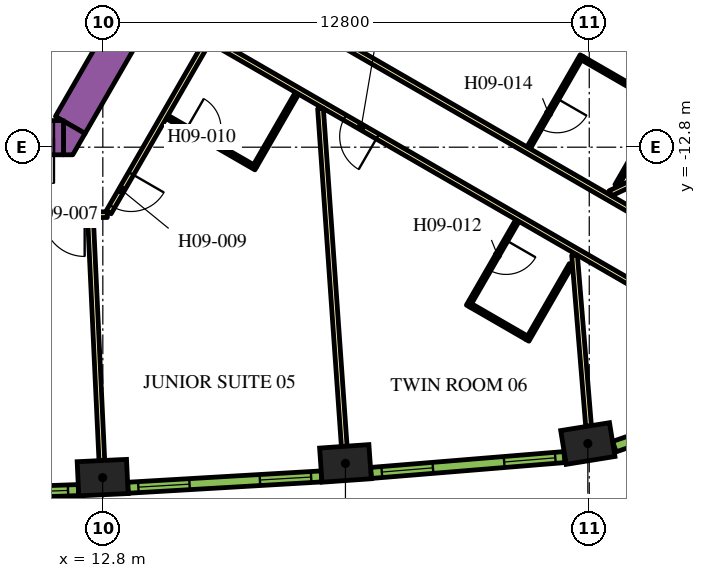
"""IFC4 building model, lengths in metres.
Left out: names, types, materials, properties, quantities, classifications, styles, units other than length and angle.
Written with IfcOpenShell. Run it as: python <this file> out.ifc"""

import sys

from ifc_helpers import new_model, si_unit, direction, frame, frame_2d, origin, origin_2d, place, context, subcontext, project, spatial, polyline, rectangle, outline, extrude, element, fill, save


model = new_model("IFC4")
c1 = context("Model", 3, precision=1e-05, world=origin(), true_north=direction((0.0, 1.0)))
c2 = subcontext(c1, "Body", "Model", "MODEL_VIEW")
j1 = project(units=[si_unit("LENGTHUNIT", "METRE"), si_unit("PLANEANGLEUNIT", "RADIAN")], contexts=[c1])
p1 = place(None, origin())
s1 = spatial("IfcSite", under=j1, at=p1, CompositionType="ELEMENT")
p2 = place(p1, origin())
s2 = spatial("IfcBuilding", under=s1, at=p2, CompositionType="ELEMENT")
p3 = place(p2, frame((0.0, 0.0, 118.8)))
s3 = spatial("IfcBuildingStorey", under=s2, at=p3, CompositionType="ELEMENT", Elevation=118.8)
for number, where, z_axis, x_axis in (
    (1, (12.795, -21.494, 0.0), (0.0, 0.0, 1.0), (0.999, 0.047, 0.0)),
    (2, (19.184, -21.12, 0.0), (0.0, 0.0, 1.0), (0.998, 0.07, 0.0)),
    (3, (25.563, -20.597, 0.0), (0.0, 0.0, 1.0), (0.987, 0.159, 0.0)),
):
    element("IfcColumn", number, at=place(p3, frame(where, z_axis=z_axis, x_axis=x_axis)), inside=s3, PredefinedType="COLUMN", context=c2, shape_type="SweptSolid", body=[
        extrude(rectangle(XDim=1.3, YDim=0.9, at=origin_2d()), origin(), (0.0, 0.0, 1.0), 3.9),
    ])
p4 = place(p3, frame((11.943, -12.214, 0.0), z_axis=(0.0, 0.0, 1.0), x_axis=(0.49998092645, 0.866036415623, 0.0)))
e4 = element("IfcWall", 4, at=p4, inside=s3, PredefinedType="SOLIDWALL", context=c2, shape_type="SweptSolid", body=[
    extrude(rectangle(XDim=8.83, YDim=0.9, at=frame_2d((4.415, 0.0))), origin(), (0.0, 0.0, 1.0), 3.9),
])
p5 = place(p3, origin())
e5 = element("IfcWall", 5, at=p5, inside=s3, PredefinedType="SOLIDWALL", context=c2, shape_type="SweptSolid", body=[
    extrude(outline(polyline([(12.009, -13.0), (11.764, -13.0), (11.764, -12.113), (12.332, -12.441), (12.009, -13.0)])), origin(), (0.0, 0.0, 1.0), 3.9),
])
p6 = place(p3, frame((11.764, -12.55, 0.0), z_axis=(0.0, 0.0, 1.0), x_axis=(-1.0, 0.0, 0.0)))
e6 = element("IfcWall", 6, at=p6, inside=s3, PredefinedType="SOLIDWALL", context=c2, shape_type="SweptSolid", body=[
    extrude(rectangle(XDim=1.7, YDim=0.9, at=frame_2d((0.85, 0.0))), origin(), (0.0, 0.0, 1.0), 3.9),
])
p7 = place(p6, frame((0.25, 0.0, 0.0)))
e7 = element("IfcOpeningElement", 7, at=p7, cuts=e6, PredefinedType="OPENING", context=c2, shape_type="SweptSolid", body=[
    extrude(rectangle(XDim=1.2, YDim=2.1, at=frame_2d((0.6, 1.05))), frame((0.0, 0.46, 0.0), z_axis=(0.0, -1.0, 0.0), x_axis=(1.0, 0.0, 0.0)), (0.0, 0.0, 1.0), 0.92),
])
p8 = place(p3, frame((16.412, -8.523, 0.0), z_axis=(0.0, 0.0, 1.0), x_axis=(0.866025629663, -0.499999608766, 0.0)))
e8 = element("IfcWall", 8, at=p8, inside=s3, PredefinedType="PARTITIONING", context=c2, shape_type="SweptSolid", body=[
    extrude(rectangle(XDim=13.624, YDim=0.15, at=frame_2d((6.812, 0.0))), origin(), (0.0, 0.0, 1.0), 2.75),
])
p9 = place(p8, frame((0.426, 0.0, 0.0)))
e9 = element("IfcOpeningElement", 9, at=p9, cuts=e8, PredefinedType="OPENING", context=c2, shape_type="SweptSolid", body=[
    extrude(rectangle(XDim=1.0, YDim=2.1, at=frame_2d((0.5, 1.05))), frame((0.0, 0.085, 0.0), z_axis=(0.0, -1.0, 0.0), x_axis=(1.0, 0.0, 0.0)), (0.0, 0.0, 1.0), 0.17),
])
p10 = place(p3, frame((12.918, -14.575, 0.0), z_axis=(0.0, 0.0, 1.0), x_axis=(-1.0, 0.0, 0.0)))
e10 = element("IfcWall", 10, at=p10, inside=s3, PredefinedType="PARTITIONING", context=c2, shape_type="SweptSolid", body=[
    extrude(rectangle(XDim=25.766, YDim=0.15, at=frame_2d((12.883, 0.0))), origin(), (0.0, 0.0, 1.0), 2.75),
])
p11 = place(p10, frame((16.189, 0.0, 0.0)))
e11 = element("IfcOpeningElement", 11, at=p11, cuts=e10, PredefinedType="OPENING", context=c2, shape_type="SweptSolid", body=[
    extrude(rectangle(XDim=1.0, YDim=2.1, at=frame_2d((0.5, 1.05))), frame((0.0, 0.085, 0.0), z_axis=(0.0, -1.0, 0.0), x_axis=(1.0, 0.0, 0.0)), (0.0, 0.0, 1.0), 0.17),
])
p12 = place(p10, frame((14.882, 0.0, 0.0)))
e12 = element("IfcOpeningElement", 12, at=p12, cuts=e10, PredefinedType="OPENING", context=c2, shape_type="SweptSolid", body=[
    extrude(rectangle(XDim=1.0, YDim=2.1, at=frame_2d((0.5, 1.05))), frame((0.0, 0.085, 0.0), z_axis=(0.0, -1.0, 0.0), x_axis=(1.0, 0.0, 0.0)), (0.0, 0.0, 1.0), 0.17),
])
p13 = place(p10, frame((0.596, 0.0, 0.0)))
e13 = element("IfcOpeningElement", 13, at=p13, cuts=e10, PredefinedType="OPENING", context=c2, shape_type="SweptSolid", body=[
    extrude(rectangle(XDim=1.1, YDim=2.1, at=frame_2d((0.55, 1.05))), frame((0.0, 0.085, 0.0), z_axis=(0.0, -1.0, 0.0), x_axis=(1.0, 0.0, 0.0)), (0.0, 0.0, 1.0), 0.17),
])
p14 = place(p3, frame((15.587, -9.952, 0.0), z_axis=(0.0, 0.0, 1.0), x_axis=(-0.500016618951, -0.866015808616, 0.0)))
e14 = element("IfcWall", 14, at=p14, inside=s3, PredefinedType="PARTITIONING", context=c2, shape_type="SweptSolid", body=[
    extrude(rectangle(XDim=5.268, YDim=0.15, at=frame_2d((2.634, 0.0))), origin(), (0.0, 0.0, 1.0), 2.75),
])
p15 = place(p14, frame((4.088, 0.0, 0.0)))
e15 = element("IfcOpeningElement", 15, at=p15, cuts=e14, PredefinedType="OPENING", context=c2, shape_type="SweptSolid", body=[
    extrude(rectangle(XDim=1.0, YDim=2.1, at=frame_2d((0.5, 1.05))), frame((0.0, 0.085, 0.0), z_axis=(0.0, -1.0, 0.0), x_axis=(1.0, 0.0, 0.0)), (0.0, 0.0, 1.0), 0.17),
])
p16 = place(p3, frame((27.386, -16.764, 0.0), z_axis=(0.0, 0.0, 1.0), x_axis=(-0.866022585856, 0.500004880763, 0.0)))
e16 = element("IfcWall", 16, at=p16, inside=s3, PredefinedType="PARTITIONING", context=c2, shape_type="SweptSolid", body=[
    extrude(rectangle(XDim=13.544, YDim=0.15, at=frame_2d((6.772, 0.0))), origin(), (0.0, 0.0, 1.0), 2.75),
])
p17 = place(p16, frame((8.491, 0.0, 0.0)))
e17 = element("IfcOpeningElement", 17, at=p17, cuts=e16, PredefinedType="OPENING", context=c2, shape_type="SweptSolid", body=[
    extrude(rectangle(XDim=1.0, YDim=2.1, at=frame_2d((0.5, 1.05))), frame((0.0, 0.085, 0.0), z_axis=(0.0, -1.0, 0.0), x_axis=(1.0, 0.0, 0.0)), (0.0, 0.0, 1.0), 0.17),
])
p18 = place(p3, frame((12.774, -21.045, 0.0), z_axis=(0.0, 0.0, 1.0), x_axis=(-0.046750341626, 0.998906605023, 0.0)))
e18 = element("IfcWall", 18, at=p18, inside=s3, PredefinedType="PARTITIONING", context=c2, shape_type="SweptSolid", body=[
    extrude(rectangle(XDim=6.392, YDim=0.15, at=frame_2d((3.196, 0.0))), origin(), (0.0, 0.0, 1.0), 2.75),
])
p19 = place(p3, frame((19.153, -20.671, 0.0), z_axis=(0.0, 0.0, 1.0), x_axis=(-0.070070736723, 0.997542025107, 0.0)))
e19 = element("IfcWall", 19, at=p19, inside=s3, PredefinedType="PARTITIONING", context=c2, shape_type="SweptSolid", body=[
    extrude(rectangle(XDim=8.909, YDim=0.15, at=frame_2d((4.455, 0.0))), origin(), (0.0, 0.0, 1.0), 2.75),
])
p20 = place(p3, frame((25.582, -20.138, 0.0), z_axis=(0.0, 0.0, 1.0), x_axis=(-0.081746132986, 0.996653184283, 0.0)))
e20 = element("IfcWall", 20, at=p20, inside=s3, PredefinedType="PARTITIONING", context=c2, shape_type="SweptSolid", body=[
    extrude(rectangle(XDim=4.51, YDim=0.15, at=frame_2d((2.255, 0.0))), origin(), (0.0, 0.0, 1.0), 2.75),
])
p21 = place(p3, frame((30.231, -12.085, 0.0), z_axis=(0.0, 0.0, 1.0), x_axis=(-0.904001132572, -0.427530060122, 0.0)))
e21 = element("IfcWall", 21, at=p21, inside=s3, PredefinedType="PARTITIONING", context=c2, shape_type="SweptSolid", body=[
    extrude(rectangle(XDim=4.51, YDim=0.15, at=frame_2d((2.255, 0.0))), origin(), (0.0, 0.0, 1.0), 2.75),
])
p22 = place(p3, frame((14.49, -12.003, 0.0), z_axis=(0.0, 0.0, 1.0), x_axis=(0.866059108428, -0.4999416173, 0.0)))
e22 = element("IfcWall", 22, at=p22, inside=s3, PredefinedType="PARTITIONING", context=c2, shape_type="SweptSolid", body=[
    extrude(rectangle(XDim=2.7, YDim=0.1, at=frame_2d((1.35, 0.0))), origin(), (0.0, 0.0, 1.0), 2.75),
])
p23 = place(p22, frame((0.6, 0.0, 0.0)))
e23 = element("IfcOpeningElement", 23, at=p23, cuts=e22, PredefinedType="OPENING", context=c2, shape_type="SweptSolid", body=[
    extrude(rectangle(XDim=0.9, YDim=2.1, at=frame_2d((0.45, 1.05))), frame((0.0, 0.06, 0.0), z_axis=(0.0, -1.0, 0.0), x_axis=(1.0, 0.0, 0.0)), (0.0, 0.0, 1.0), 0.12),
])
p24 = place(p3, frame((16.81, -13.285, 0.0), z_axis=(0.0, 0.0, 1.0), x_axis=(0.499994660107, 0.866028486751, 0.0)))
e24 = element("IfcWall", 24, at=p24, inside=s3, PredefinedType="PARTITIONING", context=c2, shape_type="SweptSolid", body=[
    extrude(rectangle(XDim=2.2, YDim=0.1, at=frame_2d((1.1, 0.0))), origin(), (0.0, 0.0, 1.0), 2.75),
])
p25 = place(p3, frame((23.71, -14.728, 0.0), z_axis=(0.0, 0.0, 1.0), x_axis=(-0.500006934395, -0.866021400173, 0.0)))
e25 = element("IfcWall", 25, at=p25, inside=s3, PredefinedType="PARTITIONING", context=c2, shape_type="SweptSolid", body=[
    extrude(rectangle(XDim=2.6, YDim=0.1, at=frame_2d((1.3, 0.0))), origin(), (0.0, 0.0, 1.0), 2.75),
])
p26 = place(p25, frame((0.6, 0.0, 0.0)))
e26 = element("IfcOpeningElement", 26, at=p26, cuts=e25, PredefinedType="OPENING", context=c2, shape_type="SweptSolid", body=[
    extrude(rectangle(XDim=0.9, YDim=2.1, at=frame_2d((0.45, 1.05))), frame((0.0, 0.06, 0.0), z_axis=(0.0, -1.0, 0.0), x_axis=(1.0, 0.0, 0.0)), (0.0, 0.0, 1.0), 0.12),
])
p27 = place(p3, frame((22.479, -16.962, 0.0), z_axis=(0.0, 0.0, 1.0), x_axis=(0.86605165483, -0.499954529098, 0.0)))
e27 = element("IfcWall", 27, at=p27, inside=s3, PredefinedType="PARTITIONING", context=c2, shape_type="SweptSolid", body=[
    extrude(rectangle(XDim=1.7, YDim=0.1, at=frame_2d((0.85, 0.0))), origin(), (0.0, 0.0, 1.0), 2.75),
])
p28 = place(p3, frame((25.119, -15.888, 0.0), z_axis=(0.0, 0.0, 1.0), x_axis=(-0.499998129301, -0.86602648383, 0.0)))
e28 = element("IfcWall", 28, at=p28, inside=s3, PredefinedType="PARTITIONING", context=c2, shape_type="SweptSolid", body=[
    extrude(rectangle(XDim=2.3, YDim=0.1, at=frame_2d((1.15, 0.0))), origin(), (0.0, 0.0, 1.0), 2.75),
])
p29 = place(p3, frame((25.404, -10.395, 0.0), z_axis=(0.0, 0.0, 1.0), x_axis=(-0.49998411664, -0.866034573852, 0.0)))
e29 = element("IfcWall", 29, at=p29, inside=s3, PredefinedType="PARTITIONING", context=c2, shape_type="SweptSolid", body=[
    extrude(rectangle(XDim=2.8, YDim=0.1, at=frame_2d((1.4, 0.0))), origin(), (0.0, 0.0, 1.0), 2.75),
])
p30 = place(p29, frame((1.3, 0.0, 0.0)))
e30 = element("IfcOpeningElement", 30, at=p30, cuts=e29, PredefinedType="OPENING", context=c2, shape_type="SweptSolid", body=[
    extrude(rectangle(XDim=0.9, YDim=2.1, at=frame_2d((0.45, 1.05))), frame((0.0, 0.06, 0.0), z_axis=(0.0, -1.0, 0.0), x_axis=(1.0, 0.0, 0.0)), (0.0, 0.0, 1.0), 0.12),
])
p31 = place(p3, frame((25.422, -10.463, 0.0), z_axis=(0.0, 0.0, 1.0), x_axis=(0.866024647952, -0.500001309137, 0.0)))
e31 = element("IfcWall", 31, at=p31, inside=s3, PredefinedType="PARTITIONING", context=c2, shape_type="SweptSolid", body=[
    extrude(rectangle(XDim=2.4, YDim=0.1, at=frame_2d((1.2, 0.0))), origin(), (0.0, 0.0, 1.0), 2.75),
])
p32 = place(p3, frame((26.319, -13.81, 0.0), z_axis=(0.0, 0.0, 1.0), x_axis=(0.500004234368, 0.866022959057, 0.0)))
e32 = element("IfcWall", 32, at=p32, inside=s3, PredefinedType="PARTITIONING", context=c2, shape_type="SweptSolid", body=[
    extrude(rectangle(XDim=2.5, YDim=0.1, at=frame_2d((1.25, 0.0))), origin(), (0.0, 0.0, 1.0), 2.75),
])
p33 = place(p3, frame((7.059, -22.001, 0.0), z_axis=(0.0, 0.0, 1.0), x_axis=(0.999385993957, 0.035037623812, 0.0)))
e33 = element("IfcWall", 33, at=p33, inside=s3, PredefinedType="SOLIDWALL", context=c2, shape_type="SweptSolid", body=[
    extrude(rectangle(XDim=5.101, YDim=0.29, at=frame_2d((2.55, 0.0))), origin(), (0.0, 0.0, 1.0), 3.65),
])
p34 = place(p33, frame((0.273, 0.0, 0.9)))
e34 = element("IfcOpeningElement", 34, at=p34, cuts=e33, PredefinedType="OPENING", context=c2, shape_type="SweptSolid", body=[
    extrude(rectangle(XDim=1.35, YDim=2.15, at=frame_2d((0.675, 1.075))), frame((0.0, 0.155, 0.0), z_axis=(0.0, -1.0, 0.0), x_axis=(1.0, 0.0, 0.0)), (0.0, 0.0, 1.0), 0.31),
])
p35 = place(p33, frame((3.478, 0.0, 0.9)))
e35 = element("IfcOpeningElement", 35, at=p35, cuts=e33, PredefinedType="OPENING", context=c2, shape_type="SweptSolid", body=[
    extrude(rectangle(XDim=1.35, YDim=2.15, at=frame_2d((0.675, 1.075))), frame((0.0, 0.155, 0.0), z_axis=(0.0, -1.0, 0.0), x_axis=(1.0, 0.0, 0.0)), (0.0, 0.0, 1.0), 0.31),
])
p36 = place(p3, frame((13.462, -21.761, 0.0), z_axis=(0.0, 0.0, 1.0), x_axis=(0.998290511436, 0.058447025388, 0.0)))
e36 = element("IfcWall", 36, at=p36, inside=s3, PredefinedType="SOLIDWALL", context=c2, shape_type="SweptSolid", body=[
    extrude(rectangle(XDim=5.1, YDim=0.29, at=frame_2d((2.55, 0.0))), origin(), (0.0, 0.0, 1.0), 3.65),
])
p37 = place(p36, frame((0.272, 0.0, 0.9)))
e37 = element("IfcOpeningElement", 37, at=p37, cuts=e36, PredefinedType="OPENING", context=c2, shape_type="SweptSolid", body=[
    extrude(rectangle(XDim=1.35, YDim=2.15, at=frame_2d((0.675, 1.075))), frame((0.0, 0.155, 0.0), z_axis=(0.0, -1.0, 0.0), x_axis=(1.0, 0.0, 0.0)), (0.0, 0.0, 1.0), 0.31),
])
p38 = place(p36, frame((3.478, 0.0, 0.9)))
e38 = element("IfcOpeningElement", 38, at=p38, cuts=e36, PredefinedType="OPENING", context=c2, shape_type="SweptSolid", body=[
    extrude(rectangle(XDim=1.35, YDim=2.15, at=frame_2d((0.675, 1.075))), frame((0.0, 0.155, 0.0), z_axis=(0.0, -1.0, 0.0), x_axis=(1.0, 0.0, 0.0)), (0.0, 0.0, 1.0), 0.31),
])
p39 = place(p3, frame((19.857, -21.371, 0.0), z_axis=(0.0, 0.0, 1.0), x_axis=(0.99665273362, 0.081751627308, 0.0)))
e39 = element("IfcWall", 39, at=p39, inside=s3, PredefinedType="SOLIDWALL", context=c2, shape_type="SweptSolid", body=[
    extrude(rectangle(XDim=5.107, YDim=0.29, at=frame_2d((2.553, 0.0))), origin(), (0.0, 0.0, 1.0), 3.65),
])
p40 = place(p39, frame((0.285, 0.0, 0.9)))
e40 = element("IfcOpeningElement", 40, at=p40, cuts=e39, PredefinedType="OPENING", context=c2, shape_type="SweptSolid", body=[
    extrude(rectangle(XDim=1.35, YDim=2.15, at=frame_2d((0.675, 1.075))), frame((0.0, 0.155, 0.0), z_axis=(0.0, -1.0, 0.0), x_axis=(1.0, 0.0, 0.0)), (0.0, 0.0, 1.0), 0.31),
])
p41 = place(p39, frame((3.516, 0.0, 0.9)))
e41 = element("IfcOpeningElement", 41, at=p41, cuts=e39, PredefinedType="OPENING", context=c2, shape_type="SweptSolid", body=[
    extrude(rectangle(XDim=1.35, YDim=2.15, at=frame_2d((0.675, 1.075))), frame((0.0, 0.155, 0.0), z_axis=(0.0, -1.0, 0.0), x_axis=(1.0, 0.0, 0.0)), (0.0, 0.0, 1.0), 0.31),
])
p42 = place(p3, frame((26.261, -20.679, 0.0), z_axis=(0.0, 0.0, 1.0), x_axis=(0.945385815453, 0.325953462844, 0.0)))
e42 = element("IfcWall", 42, at=p42, inside=s3, PredefinedType="SOLIDWALL", context=c2, shape_type="SweptSolid", body=[
    extrude(rectangle(XDim=1.819, YDim=0.29, at=frame_2d((0.91, 0.0))), origin(), (0.0, 0.0, 1.0), 3.65),
])
p43 = place(p42, frame((0.46, 0.0, 0.9)))
e43 = element("IfcOpeningElement", 43, at=p43, cuts=e42, PredefinedType="OPENING", context=c2, shape_type="SweptSolid", body=[
    extrude(rectangle(XDim=0.9, YDim=2.15, at=frame_2d((0.45, 1.075))), frame((0.0, 0.155, 0.0), z_axis=(0.0, -1.0, 0.0), x_axis=(1.0, 0.0, 0.0)), (0.0, 0.0, 1.0), 0.31),
])
p44 = place(p7, origin())
e44 = element("IfcDoor", 44, at=p44, inside=s3, OperationType="SINGLE_SWING_LEFT", PredefinedType="DOOR", context=c2, shape_type="SweptSolid", body=[
    extrude(rectangle(XDim=1.2, YDim=2.1, at=frame_2d((0.6, 1.05))), frame((0.0, 0.025, 0.0), z_axis=(0.0, -1.0, 0.0), x_axis=(1.0, 0.0, 0.0)), (0.0, 0.0, 1.0), 0.05),
])
fill(e7, e44)
p45 = place(p13, origin())
e45 = element("IfcDoor", 45, at=p45, inside=s3, OperationType="SINGLE_SWING_LEFT", PredefinedType="DOOR", context=c2, shape_type="SweptSolid", body=[
    extrude(rectangle(XDim=1.1, YDim=2.1, at=frame_2d((0.55, 1.05))), frame((0.0, 0.025, 0.0), z_axis=(0.0, -1.0, 0.0), x_axis=(1.0, 0.0, 0.0)), (0.0, 0.0, 1.0), 0.05),
])
fill(e13, e45)
p46 = place(p15, origin())
e46 = element("IfcDoor", 46, at=p46, inside=s3, OperationType="SINGLE_SWING_RIGHT", PredefinedType="DOOR", context=c2, shape_type="SweptSolid", body=[
    extrude(rectangle(XDim=1.0, YDim=2.1, at=frame_2d((0.5, 1.05))), frame((0.0, 0.025, 0.0), z_axis=(0.0, -1.0, 0.0), x_axis=(1.0, 0.0, 0.0)), (0.0, 0.0, 1.0), 0.05),
])
fill(e15, e46)
p47 = place(p23, origin())
e47 = element("IfcDoor", 47, at=p47, inside=s3, OperationType="SINGLE_SWING_LEFT", PredefinedType="DOOR", context=c2, shape_type="SweptSolid", body=[
    extrude(rectangle(XDim=0.9, YDim=2.1, at=frame_2d((0.45, 1.05))), frame((0.0, 0.025, 0.0), z_axis=(0.0, -1.0, 0.0), x_axis=(1.0, 0.0, 0.0)), (0.0, 0.0, 1.0), 0.05),
])
fill(e23, e47)
p48 = place(p17, origin())
e48 = element("IfcDoor", 48, at=p48, inside=s3, OperationType="SINGLE_SWING_RIGHT", PredefinedType="DOOR", context=c2, shape_type="SweptSolid", body=[
    extrude(rectangle(XDim=1.0, YDim=2.1, at=frame_2d((0.5, 1.05))), frame((0.0, 0.025, 0.0), z_axis=(0.0, -1.0, 0.0), x_axis=(1.0, 0.0, 0.0)), (0.0, 0.0, 1.0), 0.05),
])
fill(e17, e48)
p49 = place(p26, origin())
e49 = element("IfcDoor", 49, at=p49, inside=s3, OperationType="SINGLE_SWING_RIGHT", PredefinedType="DOOR", context=c2, shape_type="SweptSolid", body=[
    extrude(rectangle(XDim=0.9, YDim=2.1, at=frame_2d((0.45, 1.05))), frame((0.0, 0.025, 0.0), z_axis=(0.0, -1.0, 0.0), x_axis=(1.0, 0.0, 0.0)), (0.0, 0.0, 1.0), 0.05),
])
fill(e26, e49)
p50 = place(p30, origin())
e50 = element("IfcDoor", 50, at=p50, inside=s3, OperationType="SINGLE_SWING_LEFT", PredefinedType="DOOR", context=c2, shape_type="SweptSolid", body=[
    extrude(rectangle(XDim=0.9, YDim=2.1, at=frame_2d((0.45, 1.05))), frame((0.0, 0.025, 0.0), z_axis=(0.0, -1.0, 0.0), x_axis=(1.0, 0.0, 0.0)), (0.0, 0.0, 1.0), 0.05),
])
fill(e30, e50)
p51 = place(p35, origin())
e51 = element("IfcWindow", 51, at=p51, inside=s3, PartitioningType="DOUBLE_PANEL_VERTICAL", PredefinedType="WINDOW", context=c2, shape_type="SweptSolid", body=[
    extrude(rectangle(XDim=1.35, YDim=2.15, at=frame_2d((0.675, 1.075))), frame((0.0, 0.015, 0.0), z_axis=(0.0, -1.0, 0.0), x_axis=(1.0, 0.0, 0.0)), (0.0, 0.0, 1.0), 0.06),
])
fill(e35, e51)
p52 = place(p37, origin())
e52 = element("IfcWindow", 52, at=p52, inside=s3, PartitioningType="DOUBLE_PANEL_VERTICAL", PredefinedType="WINDOW", context=c2, shape_type="SweptSolid", body=[
    extrude(rectangle(XDim=1.35, YDim=2.15, at=frame_2d((0.675, 1.075))), frame((0.0, 0.015, 0.0), z_axis=(0.0, -1.0, 0.0), x_axis=(1.0, 0.0, 0.0)), (0.0, 0.0, 1.0), 0.06),
])
fill(e37, e52)
p53 = place(p38, origin())
e53 = element("IfcWindow", 53, at=p53, inside=s3, PartitioningType="DOUBLE_PANEL_VERTICAL", PredefinedType="WINDOW", context=c2, shape_type="SweptSolid", body=[
    extrude(rectangle(XDim=1.35, YDim=2.15, at=frame_2d((0.675, 1.075))), frame((0.0, 0.015, 0.0), z_axis=(0.0, -1.0, 0.0), x_axis=(1.0, 0.0, 0.0)), (0.0, 0.0, 1.0), 0.06),
])
fill(e38, e53)
p54 = place(p40, origin())
e54 = element("IfcWindow", 54, at=p54, inside=s3, PartitioningType="DOUBLE_PANEL_VERTICAL", PredefinedType="WINDOW", context=c2, shape_type="SweptSolid", body=[
    extrude(rectangle(XDim=1.35, YDim=2.15, at=frame_2d((0.675, 1.075))), frame((0.0, 0.015, 0.0), z_axis=(0.0, -1.0, 0.0), x_axis=(1.0, 0.0, 0.0)), (0.0, 0.0, 1.0), 0.06),
])
fill(e40, e54)
p55 = place(p41, origin())
e55 = element("IfcWindow", 55, at=p55, inside=s3, PartitioningType="DOUBLE_PANEL_VERTICAL", PredefinedType="WINDOW", context=c2, shape_type="SweptSolid", body=[
    extrude(rectangle(XDim=1.35, YDim=2.15, at=frame_2d((0.675, 1.075))), frame((0.0, 0.015, 0.0), z_axis=(0.0, -1.0, 0.0), x_axis=(1.0, 0.0, 0.0)), (0.0, 0.0, 1.0), 0.06),
])
fill(e41, e55)
save(model, sys.argv[1])
